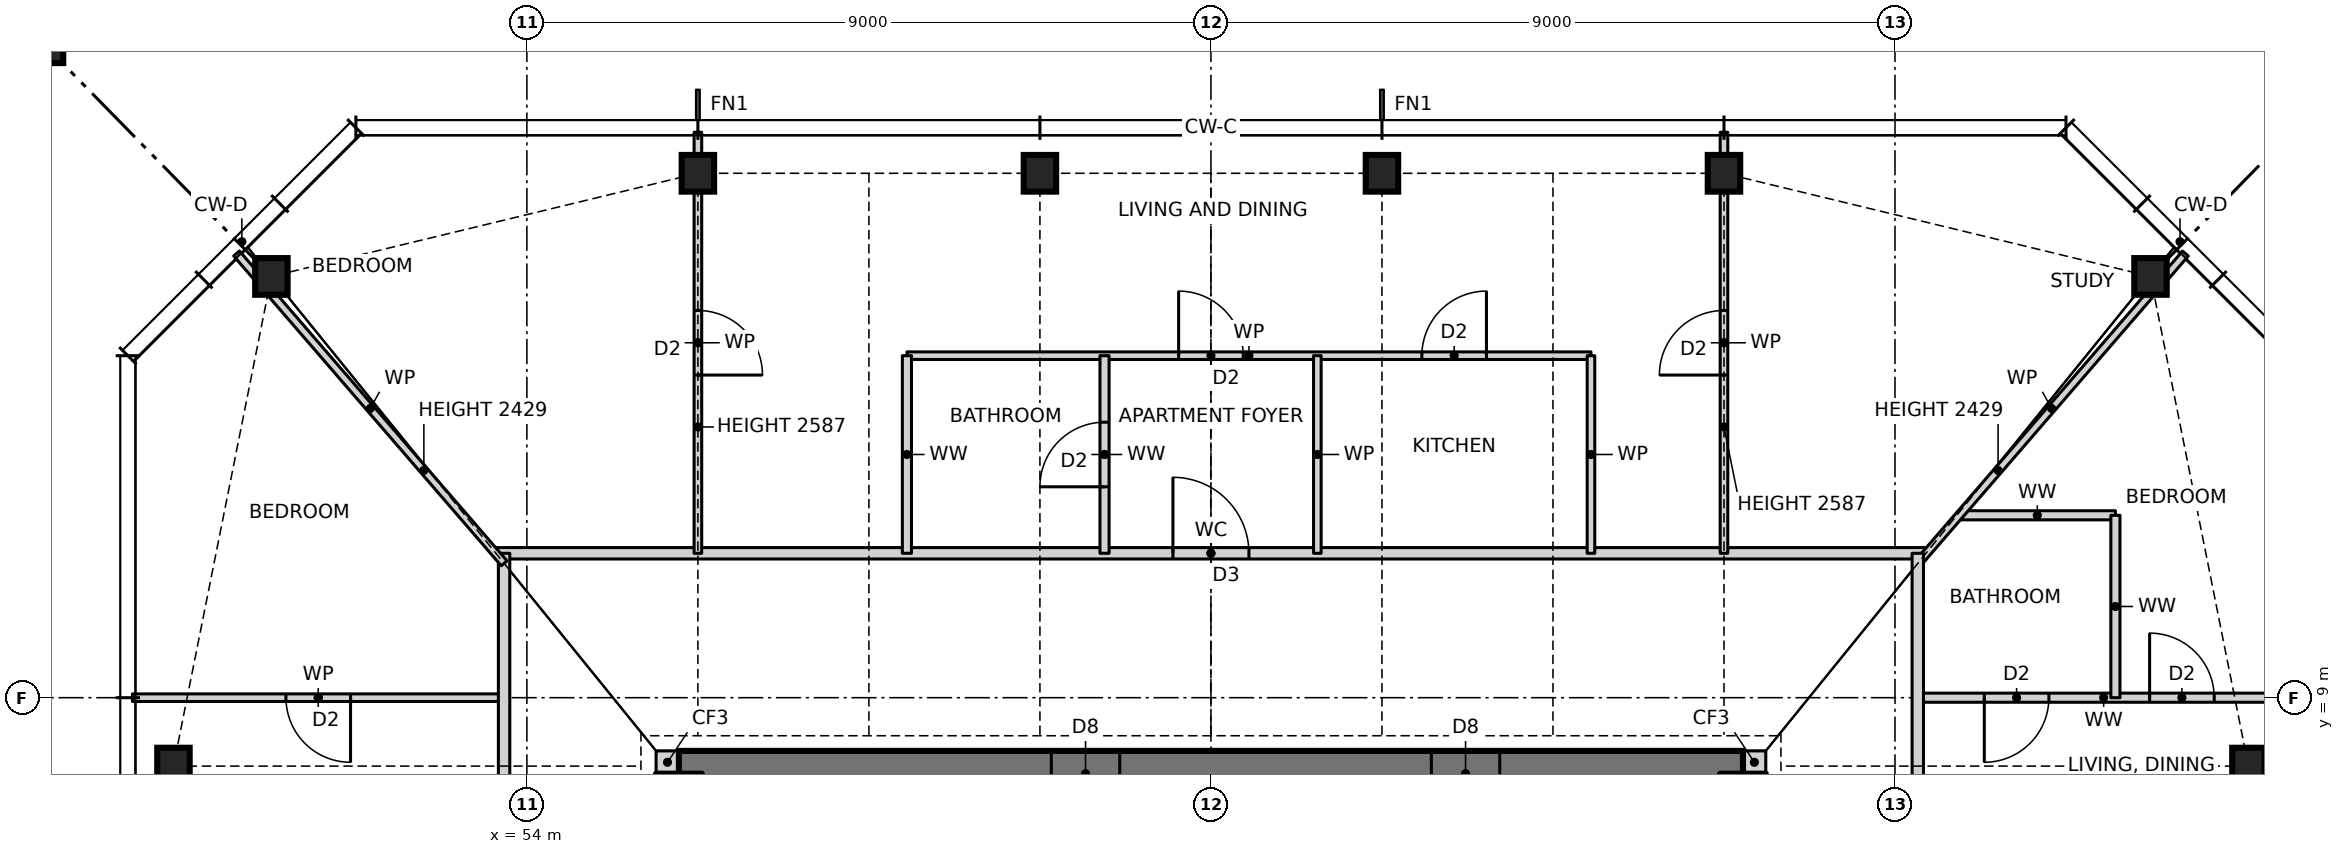
"""IFC4 building model, lengths in metres.
Left out: names, types, materials, properties, quantities, classifications, styles, units other than length and angle.
Written with IfcOpenShell. Run it as: python <this file> out.ifc"""

import sys

from ifc_helpers import new_model, si_unit, direction, frame, frame_2d, origin, origin_2d, place, context, subcontext, project, spatial, rectangle, hollow_rectangle, i_section, extrude, element, fill, save


model = new_model("IFC4")
c1 = context("Model", 3, precision=1e-05, world=origin(), true_north=direction((0.0, 1.0)))
c2 = subcontext(c1, "Body", "Model", "MODEL_VIEW")
j1 = project(units=[si_unit("LENGTHUNIT", "METRE"), si_unit("PLANEANGLEUNIT", "RADIAN")], contexts=[c1])
p1 = place(None, origin())
s1 = spatial("IfcSite", under=j1, at=p1, CompositionType="ELEMENT")
p2 = place(p1, origin())
s2 = spatial("IfcBuilding", under=s1, at=p2, CompositionType="ELEMENT")
p3 = place(p2, frame((0.0, 0.0, 108.5)))
s3 = spatial("IfcBuildingStorey", under=s2, at=p3, CompositionType="ELEMENT", Elevation=108.5)
for number, where, z_axis, x_axis in (
    (1, (76.65, 8.1, 0.0), (0.0, 0.0, 1.0), (1.0, 0.0, 0.0)),
    (2, (75.361, 14.543, 0.0), (0.0, 0.0, 1.0), (1.0, 0.0, 0.0)),
    (3, (69.75, 15.9, 0.0), (0.0, 0.0, 1.0), (1.0, 0.0, 0.0)),
    (4, (65.25, 15.9, 0.0), (0.0, 0.0, 1.0), (1.0, 0.0, 0.0)),
    (5, (60.75, 15.9, 0.0), (0.0, 0.0, 1.0), (1.0, 0.0, 0.0)),
    (6, (56.25, 15.9, 0.0), (0.0, 0.0, 1.0), (1.0, 0.0, 0.0)),
    (7, (50.639, 14.543, 0.0), (0.0, 0.0, 1.0), (1.0, 0.0, 0.0)),
    (8, (49.35, 8.1, 0.0), (0.0, 0.0, 1.0), (1.0, 0.0, 0.0)),
):
    element("IfcColumn", number, at=place(p3, frame(where, z_axis=z_axis, x_axis=x_axis)), inside=s3, PredefinedType="COLUMN", context=c2, shape_type="SweptSolid", body=[
        extrude(i_section(OverallWidth=0.427, OverallDepth=0.483, WebThickness=0.051, FlangeThickness=0.082, at=origin_2d()), origin(), (0.0, 0.0, 1.0), 3.5),
    ])
p4 = place(p3, frame((47.35, 17.9, 0.0), z_axis=(0.0, 0.0, 1.0), x_axis=(1.0, 0.0, 0.0)))
e9 = element("IfcColumn", 9, at=p4, inside=s3, PredefinedType="COLUMN", context=c2, shape_type="SweptSolid", body=[
    extrude(hollow_rectangle(XDim=1.1, YDim=1.1, WallThickness=0.06, at=origin_2d()), origin(), (0.0, 0.0, 1.0), 3.5),
])
for number, where, z_axis, x_axis in (
    (10, (70.0, 8.15, 0.0), (0.0, 0.0, 1.0), (1.0, 0.0, 0.0)),
    (11, (55.7, 8.15, 0.0), (0.0, 0.0, 1.0), (1.0, 0.0, 0.0)),
):
    element("IfcWall", number, at=place(p3, frame(where, z_axis=z_axis, x_axis=x_axis)), inside=s3, PredefinedType="SOLIDWALL", context=c2, shape_type="SweptSolid", body=[
        extrude(rectangle(XDim=0.3, YDim=0.3, at=frame_2d((0.15, 0.0))), origin(), (0.0, 0.0, 1.0), 3.5),
    ])
p5 = place(p3, frame((70.0, 8.0, 0.0), z_axis=(0.0, 0.0, 1.0), x_axis=(-1.0, 0.0, 0.0)))
e12 = element("IfcWall", 12, at=p5, inside=s3, PredefinedType="SHEAR", context=c2, shape_type="SweptSolid", body=[
    extrude(rectangle(XDim=14.0, YDim=0.6, at=frame_2d((7.0, 0.0))), origin(), (0.0, 0.0, 1.0), 3.5),
])
p6 = place(p5, frame((8.2, 0.0, 0.0)))
e13 = element("IfcOpeningElement", 13, at=p6, cuts=e12, PredefinedType="OPENING", context=c2, shape_type="SweptSolid", body=[
    extrude(rectangle(XDim=0.9, YDim=2.1, at=frame_2d((0.45, 1.05))), frame((0.0, 0.31, 0.0), z_axis=(0.0, -1.0, 0.0), x_axis=(1.0, 0.0, 0.0)), (0.0, 0.0, 1.0), 0.62),
])
p7 = place(p5, frame((3.2, 0.0, 0.0)))
e14 = element("IfcOpeningElement", 14, at=p7, cuts=e12, PredefinedType="OPENING", context=c2, shape_type="SweptSolid", body=[
    extrude(rectangle(XDim=0.9, YDim=2.1, at=frame_2d((0.45, 1.05))), frame((0.0, 0.31, 0.0), z_axis=(0.0, -1.0, 0.0), x_axis=(1.0, 0.0, 0.0)), (0.0, 0.0, 1.0), 0.62),
])
p8 = place(p3, frame((48.81, 9.0, 0.0), z_axis=(0.0, 0.0, 1.0), x_axis=(1.0, 0.0, 0.0)))
e15 = element("IfcWall", 15, at=p8, inside=s3, PredefinedType="PARTITIONING", context=c2, shape_type="SweptSolid", body=[
    extrude(rectangle(XDim=4.89, YDim=0.1, at=frame_2d((2.445, 0.0))), origin(), (0.0, 0.0, 1.0), 3.27),
])
p9 = place(p8, frame((2.02, 0.0, 0.0)))
e16 = element("IfcOpeningElement", 16, at=p9, cuts=e15, PredefinedType="OPENING", context=c2, shape_type="SweptSolid", body=[
    extrude(rectangle(XDim=0.85, YDim=2.1, at=frame_2d((0.425, 1.05))), frame((0.0, 0.06, 0.0), z_axis=(0.0, -1.0, 0.0), x_axis=(1.0, 0.0, 0.0)), (0.0, 0.0, 1.0), 0.12),
])
p10 = place(p3, frame((72.3, 9.0, 0.0), z_axis=(0.0, 0.0, 1.0), x_axis=(1.0, 0.0, 0.0)))
e17 = element("IfcWall", 17, at=p10, inside=s3, PredefinedType="PARTITIONING", context=c2, shape_type="SweptSolid", body=[
    extrude(rectangle(XDim=4.89, YDim=0.12, at=frame_2d((2.445, 0.0))), origin(), (0.0, 0.0, 1.0), 3.27),
])
p11 = place(p10, frame((0.875, 0.0, 0.0)))
e18 = element("IfcOpeningElement", 18, at=p11, cuts=e17, PredefinedType="OPENING", context=c2, shape_type="SweptSolid", body=[
    extrude(rectangle(XDim=0.85, YDim=2.1, at=frame_2d((0.425, 1.05))), frame((0.0, 0.07, 0.0), z_axis=(0.0, -1.0, 0.0), x_axis=(1.0, 0.0, 0.0)), (0.0, 0.0, 1.0), 0.14),
])
p12 = place(p10, frame((3.05, 0.0, 0.0)))
e19 = element("IfcOpeningElement", 19, at=p12, cuts=e17, PredefinedType="OPENING", context=c2, shape_type="SweptSolid", body=[
    extrude(rectangle(XDim=0.85, YDim=2.1, at=frame_2d((0.425, 1.05))), frame((0.0, 0.07, 0.0), z_axis=(0.0, -1.0, 0.0), x_axis=(1.0, 0.0, 0.0)), (0.0, 0.0, 1.0), 0.14),
])
p13 = place(p3, frame((53.586, 10.9, 0.0), z_axis=(0.0, 0.0, 1.0), x_axis=(1.0, 0.0, 0.0)))
e20 = element("IfcWall", 20, at=p13, inside=s3, PredefinedType="PARTITIONING", context=c2, shape_type="SweptSolid", body=[
    extrude(rectangle(XDim=18.828, YDim=0.15, at=frame_2d((9.414, 0.0))), origin(), (0.0, 0.0, 1.0), 3.27),
])
p14 = place(p13, frame((8.914, 0.0, 0.0)))
e21 = element("IfcOpeningElement", 21, at=p14, cuts=e20, PredefinedType="OPENING", context=c2, shape_type="SweptSolid", body=[
    extrude(rectangle(XDim=1.0, YDim=2.1, at=frame_2d((0.5, 1.05))), frame((0.0, 0.085, 0.0), z_axis=(0.0, -1.0, 0.0), x_axis=(1.0, 0.0, 0.0)), (0.0, 0.0, 1.0), 0.17),
])
p15 = place(p3, frame((72.845, 11.4, 0.0), z_axis=(0.0, 0.0, 1.0), x_axis=(1.0, 0.0, 0.0)))
e22 = element("IfcWall", 22, at=p15, inside=s3, PredefinedType="PARTITIONING", context=c2, shape_type="SweptSolid", body=[
    extrude(rectangle(XDim=2.055, YDim=0.12, at=frame_2d((1.027, 0.0))), origin(), (0.0, 0.0, 1.0), 3.27),
])
p16 = place(p3, frame((59.0, 13.5, 0.0), z_axis=(0.0, 0.0, 1.0), x_axis=(1.0, 0.0, 0.0)))
e23 = element("IfcWall", 23, at=p16, inside=s3, PredefinedType="PARTITIONING", context=c2, shape_type="SweptSolid", body=[
    extrude(rectangle(XDim=9.0, YDim=0.1, at=frame_2d((4.5, 0.0))), origin(), (0.0, 0.0, 1.0), 3.27),
])
p17 = place(p16, frame((6.775, 0.0, 0.0)))
e24 = element("IfcOpeningElement", 24, at=p17, cuts=e23, PredefinedType="OPENING", context=c2, shape_type="SweptSolid", body=[
    extrude(rectangle(XDim=0.85, YDim=2.1, at=frame_2d((0.425, 1.05))), frame((0.0, 0.06, 0.0), z_axis=(0.0, -1.0, 0.0), x_axis=(1.0, 0.0, 0.0)), (0.0, 0.0, 1.0), 0.12),
])
p18 = place(p16, frame((3.575, 0.0, 0.0)))
e25 = element("IfcOpeningElement", 25, at=p18, cuts=e23, PredefinedType="OPENING", context=c2, shape_type="SweptSolid", body=[
    extrude(rectangle(XDim=0.85, YDim=2.1, at=frame_2d((0.425, 1.05))), frame((0.0, 0.06, 0.0), z_axis=(0.0, -1.0, 0.0), x_axis=(1.0, 0.0, 0.0)), (0.0, 0.0, 1.0), 0.12),
])
p19 = place(p3, frame((72.3, 10.768, 0.0), z_axis=(0.0, 0.0, 1.0), x_axis=(0.653709560919, 0.756745538449, 0.0)))
e26 = element("IfcWall", 26, at=p19, inside=s3, PredefinedType="PARTITIONING", context=c2, shape_type="SweptSolid", body=[
    extrude(rectangle(XDim=5.386, YDim=0.1, at=frame_2d((2.693, 0.0))), origin(), (0.0, 0.0, 1.0), 2.429),
])
p20 = place(p3, frame((74.9, 9.0, 0.0), z_axis=(0.0, 0.0, 1.0), x_axis=(0.0, 1.0, 0.0)))
e27 = element("IfcWall", 27, at=p20, inside=s3, PredefinedType="PARTITIONING", context=c2, shape_type="SweptSolid", body=[
    extrude(rectangle(XDim=2.4, YDim=0.12, at=frame_2d((1.2, 0.0))), origin(), (0.0, 0.0, 1.0), 3.27),
])
p21 = place(p3, frame((72.3, -10.768, 0.0), z_axis=(0.0, 0.0, 1.0), x_axis=(0.0, 1.0, 0.0)))
e28 = element("IfcWall", 28, at=p21, inside=s3, PredefinedType="PARTITIONING", context=c2, shape_type="SweptSolid", body=[
    extrude(rectangle(XDim=21.668, YDim=0.15, at=frame_2d((10.834, 0.0))), origin(), (0.0, 0.0, 1.0), 3.27),
])
p22 = place(p21, frame((6.268, 0.0, 0.0)))
e29 = element("IfcOpeningElement", 29, at=p22, cuts=e28, PredefinedType="OPENING", context=c2, shape_type="SweptSolid", body=[
    extrude(rectangle(XDim=1.0, YDim=2.1, at=frame_2d((0.5, 1.05))), frame((0.0, 0.085, 0.0), z_axis=(0.0, -1.0, 0.0), x_axis=(1.0, 0.0, 0.0)), (0.0, 0.0, 1.0), 0.17),
])
p23 = place(p21, frame((16.168, 0.0, 0.0)))
e30 = element("IfcOpeningElement", 30, at=p23, cuts=e28, PredefinedType="OPENING", context=c2, shape_type="SweptSolid", body=[
    extrude(rectangle(XDim=1.0, YDim=2.1, at=frame_2d((0.5, 1.05))), frame((0.0, 0.085, 0.0), z_axis=(0.0, -1.0, 0.0), x_axis=(1.0, 0.0, 0.0)), (0.0, 0.0, 1.0), 0.17),
])
p24 = place(p3, frame((69.75, 10.9, 0.0), z_axis=(0.0, 0.0, 1.0), x_axis=(0.0, 1.0, 0.0)))
e31 = element("IfcWall", 31, at=p24, inside=s3, PredefinedType="PARTITIONING", context=c2, shape_type="SweptSolid", body=[
    extrude(rectangle(XDim=5.54, YDim=0.1, at=frame_2d((2.77, 0.0))), origin(), (0.0, 0.0, 1.0), 2.587),
])
p25 = place(p24, frame((2.345, 0.0, 0.0)))
e32 = element("IfcOpeningElement", 32, at=p25, cuts=e31, PredefinedType="OPENING", context=c2, shape_type="SweptSolid", body=[
    extrude(rectangle(XDim=0.85, YDim=2.1, at=frame_2d((0.425, 1.05))), frame((0.0, 0.06, 0.0), z_axis=(0.0, -1.0, 0.0), x_axis=(1.0, 0.0, 0.0)), (0.0, 0.0, 1.0), 0.12),
])
for number, where, z_axis, x_axis in (
    (33, (68.0, 10.9, 0.0), (0.0, 0.0, 1.0), (0.0, 1.0, 0.0)),
    (34, (64.4, 10.9, 0.0), (0.0, 0.0, 1.0), (0.0, 1.0, 0.0)),
):
    element("IfcWall", number, at=place(p3, frame(where, z_axis=z_axis, x_axis=x_axis)), inside=s3, PredefinedType="PARTITIONING", context=c2, shape_type="SweptSolid", body=[
        extrude(rectangle(XDim=2.6, YDim=0.1, at=frame_2d((1.3, 0.0))), origin(), (0.0, 0.0, 1.0), 3.27),
    ])
p26 = place(p3, frame((61.6, 10.9, 0.0), z_axis=(0.0, 0.0, 1.0), x_axis=(0.0, 1.0, 0.0)))
e35 = element("IfcWall", 35, at=p26, inside=s3, PredefinedType="PARTITIONING", context=c2, shape_type="SweptSolid", body=[
    extrude(rectangle(XDim=2.6, YDim=0.12, at=frame_2d((1.3, 0.0))), origin(), (0.0, 0.0, 1.0), 3.27),
])
p27 = place(p26, frame((0.875, 0.0, 0.0)))
e36 = element("IfcOpeningElement", 36, at=p27, cuts=e35, PredefinedType="OPENING", context=c2, shape_type="SweptSolid", body=[
    extrude(rectangle(XDim=0.85, YDim=2.1, at=frame_2d((0.425, 1.05))), frame((0.0, 0.07, 0.0), z_axis=(0.0, -1.0, 0.0), x_axis=(1.0, 0.0, 0.0)), (0.0, 0.0, 1.0), 0.14),
])
p28 = place(p3, frame((59.0, 10.9, 0.0), z_axis=(0.0, 0.0, 1.0), x_axis=(0.0, 1.0, 0.0)))
e37 = element("IfcWall", 37, at=p28, inside=s3, PredefinedType="PARTITIONING", context=c2, shape_type="SweptSolid", body=[
    extrude(rectangle(XDim=2.6, YDim=0.12, at=frame_2d((1.3, 0.0))), origin(), (0.0, 0.0, 1.0), 3.27),
])
p29 = place(p3, frame((56.25, 10.9, 0.0), z_axis=(0.0, 0.0, 1.0), x_axis=(0.0, 1.0, 0.0)))
e38 = element("IfcWall", 38, at=p29, inside=s3, PredefinedType="PARTITIONING", context=c2, shape_type="SweptSolid", body=[
    extrude(rectangle(XDim=5.54, YDim=0.1, at=frame_2d((2.77, 0.0))), origin(), (0.0, 0.0, 1.0), 2.587),
])
p30 = place(p29, frame((2.345, 0.0, 0.0)))
e39 = element("IfcOpeningElement", 39, at=p30, cuts=e38, PredefinedType="OPENING", context=c2, shape_type="SweptSolid", body=[
    extrude(rectangle(XDim=0.85, YDim=2.1, at=frame_2d((0.425, 1.05))), frame((0.0, 0.06, 0.0), z_axis=(0.0, -1.0, 0.0), x_axis=(1.0, 0.0, 0.0)), (0.0, 0.0, 1.0), 0.12),
])
p31 = place(p3, frame((53.7, -10.768, 0.0), z_axis=(0.0, 0.0, 1.0), x_axis=(0.0, 1.0, 0.0)))
e40 = element("IfcWall", 40, at=p31, inside=s3, PredefinedType="PARTITIONING", context=c2, shape_type="SweptSolid", body=[
    extrude(rectangle(XDim=21.668, YDim=0.15, at=frame_2d((10.834, 0.0))), origin(), (0.0, 0.0, 1.0), 3.27),
])
p32 = place(p31, frame((10.268, 0.0, 0.0)))
e41 = element("IfcOpeningElement", 41, at=p32, cuts=e40, PredefinedType="OPENING", context=c2, shape_type="SweptSolid", body=[
    extrude(rectangle(XDim=1.0, YDim=2.1, at=frame_2d((0.5, 1.05))), frame((0.0, 0.085, 0.0), z_axis=(0.0, -1.0, 0.0), x_axis=(1.0, 0.0, 0.0)), (0.0, 0.0, 1.0), 0.17),
])
p33 = place(p3, frame((53.701, 10.768, 0.0), z_axis=(0.0, 0.0, 1.0), x_axis=(-0.653623410225, 0.756819950586, 0.0)))
e42 = element("IfcWall", 42, at=p33, inside=s3, PredefinedType="PARTITIONING", context=c2, shape_type="SweptSolid", body=[
    extrude(rectangle(XDim=5.387, YDim=0.1, at=frame_2d((2.693, 0.0))), origin(), (0.0, 0.0, 1.0), 2.429),
])
p34 = place(p11, frame((0.85, 0.0, 0.0), z_axis=(0.0, 0.0, 1.0), x_axis=(-1.0, 0.0, 0.0)))
e43 = element("IfcDoor", 43, at=p34, inside=s3, OperationType="SINGLE_SWING_RIGHT", PredefinedType="DOOR", context=c2, shape_type="SweptSolid", body=[
    extrude(rectangle(XDim=0.85, YDim=2.1, at=frame_2d((0.425, 1.05))), frame((0.0, 0.025, 0.0), z_axis=(0.0, -1.0, 0.0), x_axis=(1.0, 0.0, 0.0)), (0.0, 0.0, 1.0), 0.05),
])
fill(e18, e43)
p35 = place(p12, origin())
e44 = element("IfcDoor", 44, at=p35, inside=s3, OperationType="SINGLE_SWING_LEFT", PredefinedType="DOOR", context=c2, shape_type="SweptSolid", body=[
    extrude(rectangle(XDim=0.85, YDim=2.1, at=frame_2d((0.425, 1.05))), frame((0.0, 0.025, 0.0), z_axis=(0.0, -1.0, 0.0), x_axis=(1.0, 0.0, 0.0)), (0.0, 0.0, 1.0), 0.05),
])
fill(e19, e44)
p36 = place(p17, origin())
e45 = element("IfcDoor", 45, at=p36, inside=s3, OperationType="SINGLE_SWING_RIGHT", PredefinedType="DOOR", context=c2, shape_type="SweptSolid", body=[
    extrude(rectangle(XDim=0.85, YDim=2.1, at=frame_2d((0.425, 1.05))), frame((0.0, 0.025, 0.0), z_axis=(0.0, -1.0, 0.0), x_axis=(1.0, 0.0, 0.0)), (0.0, 0.0, 1.0), 0.05),
])
fill(e24, e45)
p37 = place(p14, origin())
e46 = element("IfcDoor", 46, at=p37, inside=s3, OperationType="SINGLE_SWING_LEFT", PredefinedType="DOOR", context=c2, shape_type="SweptSolid", body=[
    extrude(rectangle(XDim=1.0, YDim=2.1, at=frame_2d((0.5, 1.05))), frame((0.0, 0.025, 0.0), z_axis=(0.0, -1.0, 0.0), x_axis=(1.0, 0.0, 0.0)), (0.0, 0.0, 1.0), 0.05),
])
fill(e21, e46)
p38 = place(p18, origin())
e47 = element("IfcDoor", 47, at=p38, inside=s3, OperationType="SINGLE_SWING_LEFT", PredefinedType="DOOR", context=c2, shape_type="SweptSolid", body=[
    extrude(rectangle(XDim=0.85, YDim=2.1, at=frame_2d((0.425, 1.05))), frame((0.0, 0.025, 0.0), z_axis=(0.0, -1.0, 0.0), x_axis=(1.0, 0.0, 0.0)), (0.0, 0.0, 1.0), 0.05),
])
fill(e25, e47)
p39 = place(p27, origin())
e48 = element("IfcDoor", 48, at=p39, inside=s3, OperationType="SINGLE_SWING_LEFT", PredefinedType="DOOR", context=c2, shape_type="SweptSolid", body=[
    extrude(rectangle(XDim=0.85, YDim=2.1, at=frame_2d((0.425, 1.05))), frame((0.0, 0.025, 0.0), z_axis=(0.0, -1.0, 0.0), x_axis=(1.0, 0.0, 0.0)), (0.0, 0.0, 1.0), 0.05),
])
fill(e36, e48)
p40 = place(p25, origin())
e49 = element("IfcDoor", 49, at=p40, inside=s3, OperationType="SINGLE_SWING_LEFT", PredefinedType="DOOR", context=c2, shape_type="SweptSolid", body=[
    extrude(rectangle(XDim=0.85, YDim=2.1, at=frame_2d((0.425, 1.05))), frame((0.0, 0.025, 0.0), z_axis=(0.0, -1.0, 0.0), x_axis=(1.0, 0.0, 0.0)), (0.0, 0.0, 1.0), 0.05),
])
fill(e32, e49)
p41 = place(p30, frame((0.85, 0.0, 0.0), z_axis=(0.0, 0.0, 1.0), x_axis=(-1.0, 0.0, 0.0)))
e50 = element("IfcDoor", 50, at=p41, inside=s3, OperationType="SINGLE_SWING_RIGHT", PredefinedType="DOOR", context=c2, shape_type="SweptSolid", body=[
    extrude(rectangle(XDim=0.85, YDim=2.1, at=frame_2d((0.425, 1.05))), frame((0.0, 0.025, 0.0), z_axis=(0.0, -1.0, 0.0), x_axis=(1.0, 0.0, 0.0)), (0.0, 0.0, 1.0), 0.05),
])
fill(e39, e50)
p42 = place(p9, frame((0.85, 0.0, 0.0), z_axis=(0.0, 0.0, 1.0), x_axis=(-1.0, 0.0, 0.0)))
e51 = element("IfcDoor", 51, at=p42, inside=s3, OperationType="SINGLE_SWING_LEFT", PredefinedType="DOOR", context=c2, shape_type="SweptSolid", body=[
    extrude(rectangle(XDim=0.85, YDim=2.1, at=frame_2d((0.425, 1.05))), frame((0.0, 0.025, 0.0), z_axis=(0.0, -1.0, 0.0), x_axis=(1.0, 0.0, 0.0)), (0.0, 0.0, 1.0), 0.05),
])
fill(e16, e51)
p43 = place(p6, origin())
e52 = element("IfcDoor", 52, at=p43, inside=s3, OperationType="SINGLE_SWING_RIGHT", PredefinedType="DOOR", context=c2, shape_type="SweptSolid", body=[
    extrude(rectangle(XDim=0.9, YDim=2.1, at=frame_2d((0.45, 1.05))), frame((0.0, 0.025, 0.0), z_axis=(0.0, -1.0, 0.0), x_axis=(1.0, 0.0, 0.0)), (0.0, 0.0, 1.0), 0.05),
])
fill(e13, e52)
p44 = place(p7, origin())
e53 = element("IfcDoor", 53, at=p44, inside=s3, OperationType="SINGLE_SWING_RIGHT", PredefinedType="DOOR", context=c2, shape_type="SweptSolid", body=[
    extrude(rectangle(XDim=0.9, YDim=2.1, at=frame_2d((0.45, 1.05))), frame((0.0, 0.025, 0.0), z_axis=(0.0, -1.0, 0.0), x_axis=(1.0, 0.0, 0.0)), (0.0, 0.0, 1.0), 0.05),
])
fill(e14, e53)
save(model, sys.argv[1])
